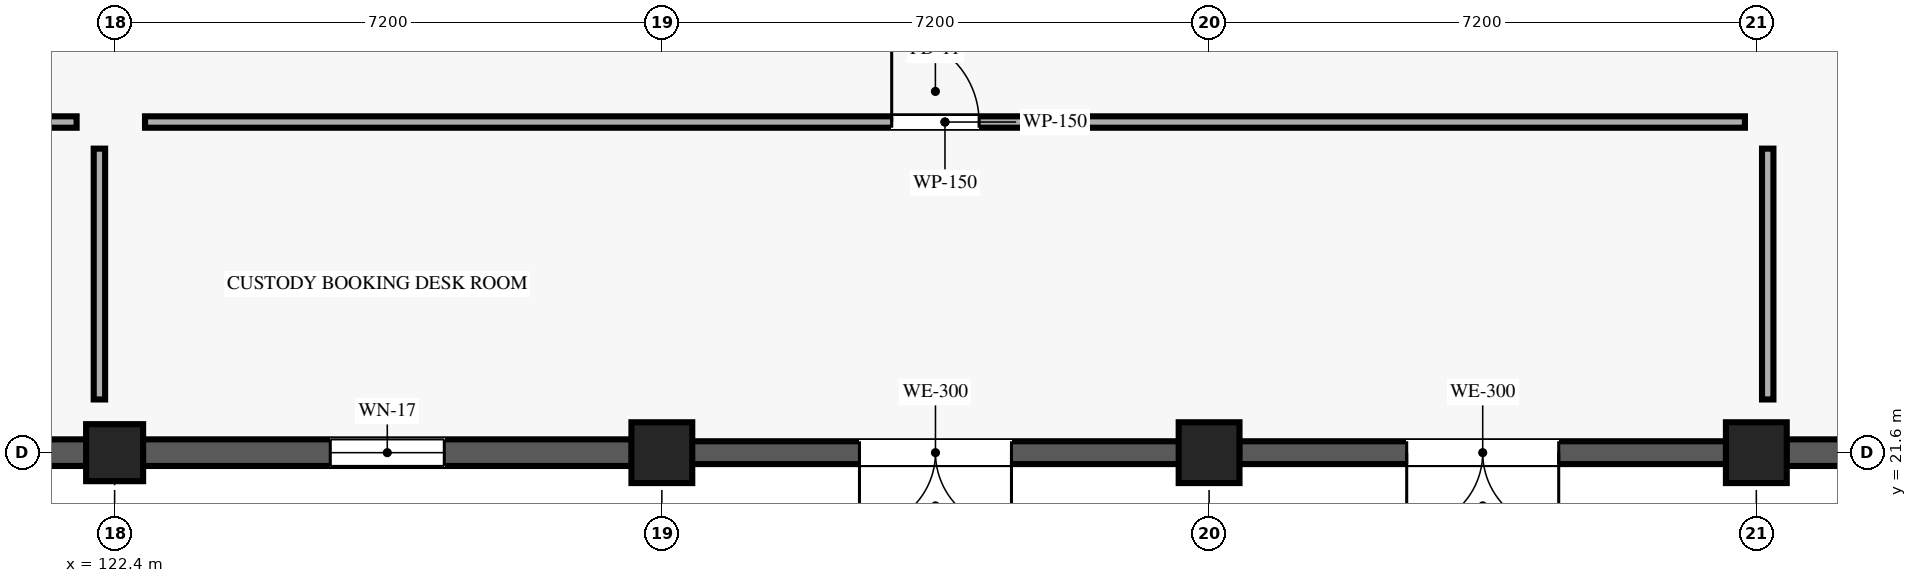
"""IFC4 building model, lengths in metres.
Left out: names, types, materials, properties, quantities, classifications, styles, units other than length and angle.
Written with IfcOpenShell. Run it as: python <this file> out.ifc"""

import sys

from ifc_helpers import new_model, si_unit, direction, frame, frame_2d, origin, origin_2d, place, context, subcontext, project, spatial, rectangle, extrude, element, fill, save


model = new_model("IFC4")
c1 = context("Model", 3, precision=1e-05, world=origin(), true_north=direction((0.0, 1.0)))
c2 = subcontext(c1, "Body", "Model", "MODEL_VIEW")
j1 = project(units=[si_unit("LENGTHUNIT", "METRE"), si_unit("PLANEANGLEUNIT", "RADIAN")], contexts=[c1])
p1 = place(None, origin())
s1 = spatial("IfcSite", under=j1, at=p1, CompositionType="ELEMENT")
p2 = place(p1, origin())
s2 = spatial("IfcBuilding", under=s1, at=p2, CompositionType="ELEMENT")
p3 = place(p2, origin())
s3 = spatial("IfcBuildingStorey", under=s2, at=p3, CompositionType="ELEMENT", Elevation=0.0)
p4 = place(p3, frame((122.4, 21.6, 0.0), z_axis=(0.0, 0.0, 1.0), x_axis=(1.0, 0.0, 0.0)))
e1 = element("IfcColumn", 1, at=p4, inside=s3, PredefinedType="COLUMN", context=c2, shape_type="SweptSolid", body=[
    extrude(rectangle(XDim=0.75, YDim=0.75, at=origin_2d()), origin(), (0.0, 0.0, 1.0), 5.4),
])
for number, where, z_axis, x_axis in (
    (2, (129.6, 21.6, 0.0), (0.0, 0.0, 1.0), (1.0, 0.0, 0.0)),
    (3, (136.8, 21.6, 0.0), (0.0, 0.0, 1.0), (1.0, 0.0, 0.0)),
    (4, (144.0, 21.6, 0.0), (0.0, 0.0, 1.0), (1.0, 0.0, 0.0)),
):
    element("IfcColumn", number, at=place(p3, frame(where, z_axis=z_axis, x_axis=x_axis)), inside=s3, PredefinedType="COLUMN", context=c2, shape_type="SweptSolid", body=[
        extrude(rectangle(XDim=0.8, YDim=0.8, at=origin_2d()), origin(), (0.0, 0.0, 1.0), 5.4),
    ])
p5 = place(p3, frame((115.57, 21.6, 0.0), z_axis=(0.0, 0.0, 1.0), x_axis=(1.0, 0.0, 0.0)))
e5 = element("IfcWall", 5, at=p5, inside=s3, PredefinedType="SOLIDWALL", context=c2, shape_type="SweptSolid", body=[
    extrude(rectangle(XDim=6.46, YDim=0.35, at=frame_2d((3.23, 0.0))), origin(), (0.0, 0.0, 1.0), 5.16),
])
p6 = place(p5, frame((2.33, 0.0, 1.85)))
e6 = element("IfcOpeningElement", 6, at=p6, cuts=e5, PredefinedType="OPENING", context=c2, shape_type="SweptSolid", body=[
    extrude(rectangle(XDim=1.8, YDim=0.75, at=frame_2d((0.9, 0.375))), frame((0.0, 0.185, 0.0), z_axis=(0.0, -1.0, 0.0), x_axis=(1.0, 0.0, 0.0)), (0.0, 0.0, 1.0), 0.37),
])
p7 = place(p3, frame((122.77, 21.6, 0.0), z_axis=(0.0, 0.0, 1.0), x_axis=(1.0, 0.0, 0.0)))
e7 = element("IfcWall", 7, at=p7, inside=s3, PredefinedType="SOLIDWALL", context=c2, shape_type="SweptSolid", body=[
    extrude(rectangle(XDim=6.435, YDim=0.35, at=frame_2d((3.218, 0.0))), origin(), (0.0, 0.0, 1.0), 5.16),
])
p8 = place(p7, frame((2.468, 0.0, 1.85)))
e8 = element("IfcOpeningElement", 8, at=p8, cuts=e7, PredefinedType="OPENING", context=c2, shape_type="SweptSolid", body=[
    extrude(rectangle(XDim=1.5, YDim=0.7, at=frame_2d((0.75, 0.35))), frame((0.0, 0.185, 0.0), z_axis=(0.0, -1.0, 0.0), x_axis=(1.0, 0.0, 0.0)), (0.0, 0.0, 1.0), 0.37),
])
p9 = place(p3, frame((136.405, 21.6, 0.0), z_axis=(0.0, 0.0, 1.0), x_axis=(-1.0, 0.0, 0.0)))
e9 = element("IfcWall", 9, at=p9, inside=s3, PredefinedType="SOLIDWALL", context=c2, shape_type="SweptSolid", body=[
    extrude(rectangle(XDim=6.41, YDim=0.3, at=frame_2d((3.205, 0.0))), origin(), (0.0, 0.0, 1.0), 5.16),
])
p10 = place(p9, frame((2.205, 0.0, 0.0)))
e10 = element("IfcOpeningElement", 10, at=p10, cuts=e9, PredefinedType="OPENING", context=c2, shape_type="SweptSolid", body=[
    extrude(rectangle(XDim=2.0, YDim=2.3, at=frame_2d((1.0, 1.15))), frame((0.0, 0.16, 0.0), z_axis=(0.0, -1.0, 0.0), x_axis=(1.0, 0.0, 0.0)), (0.0, 0.0, 1.0), 0.32),
])
p11 = place(p3, frame((143.605, 21.6, 0.0), z_axis=(0.0, 0.0, 1.0), x_axis=(-1.0, 0.0, 0.0)))
e11 = element("IfcWall", 11, at=p11, inside=s3, PredefinedType="SOLIDWALL", context=c2, shape_type="SweptSolid", body=[
    extrude(rectangle(XDim=6.41, YDim=0.3, at=frame_2d((3.205, 0.0))), origin(), (0.0, 0.0, 1.0), 5.16),
])
p12 = place(p11, frame((2.205, 0.0, 0.0)))
e12 = element("IfcOpeningElement", 12, at=p12, cuts=e11, PredefinedType="OPENING", context=c2, shape_type="SweptSolid", body=[
    extrude(rectangle(XDim=2.0, YDim=2.3, at=frame_2d((1.0, 1.15))), frame((0.0, 0.16, 0.0), z_axis=(0.0, -1.0, 0.0), x_axis=(1.0, 0.0, 0.0)), (0.0, 0.0, 1.0), 0.32),
])
p13 = place(p3, frame((144.395, 21.6, 0.0), z_axis=(0.0, 0.0, 1.0), x_axis=(1.0, 0.0, 0.0)))
e13 = element("IfcWall", 13, at=p13, inside=s3, PredefinedType="SOLIDWALL", context=c2, shape_type="SweptSolid", body=[
    extrude(rectangle(XDim=6.41, YDim=0.35, at=frame_2d((3.205, 0.0))), origin(), (0.0, 0.0, 1.0), 5.16),
])
p14 = place(p13, frame((2.305, 0.0, 1.85)))
e14 = element("IfcOpeningElement", 14, at=p14, cuts=e13, PredefinedType="OPENING", context=c2, shape_type="SweptSolid", body=[
    extrude(rectangle(XDim=1.8, YDim=0.75, at=frame_2d((0.9, 0.375))), frame((0.0, 0.185, 0.0), z_axis=(0.0, -1.0, 0.0), x_axis=(1.0, 0.0, 0.0)), (0.0, 0.0, 1.0), 0.37),
])
p15 = place(p3, frame((122.2, 22.3, 0.0), z_axis=(0.0, 0.0, 1.0), x_axis=(0.0, 1.0, 0.0)))
e15 = element("IfcWall", 15, at=p15, inside=s3, PredefinedType="PARTITIONING", context=c2, shape_type="SweptSolid", body=[
    extrude(rectangle(XDim=3.3, YDim=0.15, at=frame_2d((1.65, 0.0))), origin(), (0.0, 0.0, 1.0), 4.5),
])
p16 = place(p3, frame((108.65, 25.95, 0.0), z_axis=(0.0, 0.0, 1.0), x_axis=(1.0, 0.0, 0.0)))
e16 = element("IfcWall", 16, at=p16, inside=s3, PredefinedType="PARTITIONING", context=c2, shape_type="SweptSolid", body=[
    extrude(rectangle(XDim=13.25, YDim=0.15, at=frame_2d((6.625, 0.0))), origin(), (0.0, 0.0, 1.0), 5.16),
])
p17 = place(p16, frame((9.58, 0.0, 0.0)))
e17 = element("IfcOpeningElement", 17, at=p17, cuts=e16, PredefinedType="OPENING", context=c2, shape_type="SweptSolid", body=[
    extrude(rectangle(XDim=1.15, YDim=2.15, at=frame_2d((0.575, 1.075))), frame((0.0, 0.085, 0.0), z_axis=(0.0, -1.0, 0.0), x_axis=(1.0, 0.0, 0.0)), (0.0, 0.0, 1.0), 0.17),
])
p18 = place(p3, frame((144.15, 22.3, 0.0), z_axis=(0.0, 0.0, 1.0), x_axis=(0.0, 1.0, 0.0)))
e18 = element("IfcWall", 18, at=p18, inside=s3, PredefinedType="PARTITIONING", context=c2, shape_type="SweptSolid", body=[
    extrude(rectangle(XDim=3.3, YDim=0.15, at=frame_2d((1.65, 0.0))), origin(), (0.0, 0.0, 1.0), 4.5),
])
p19 = place(p3, frame((122.8, 25.95, 0.0), z_axis=(0.0, 0.0, 1.0), x_axis=(1.0, 0.0, 0.0)))
e19 = element("IfcWall", 19, at=p19, inside=s3, PredefinedType="PARTITIONING", context=c2, shape_type="SweptSolid", body=[
    extrude(rectangle(XDim=21.05, YDim=0.15, at=frame_2d((10.525, 0.0))), origin(), (0.0, 0.0, 1.0), 5.16),
])
p20 = place(p19, frame((9.824, 0.0, 0.0)))
e20 = element("IfcOpeningElement", 20, at=p20, cuts=e19, PredefinedType="OPENING", context=c2, shape_type="SweptSolid", body=[
    extrude(rectangle(XDim=1.15, YDim=2.15, at=frame_2d((0.575, 1.075))), frame((0.0, 0.085, 0.0), z_axis=(0.0, -1.0, 0.0), x_axis=(1.0, 0.0, 0.0)), (0.0, 0.0, 1.0), 0.17),
])
p21 = place(p8, origin())
e21 = element("IfcWindow", 21, at=p21, inside=s3, PartitioningType="SINGLE_PANEL", PredefinedType="WINDOW", context=c2, shape_type="SweptSolid", body=[
    extrude(rectangle(XDim=1.5, YDim=0.7, at=frame_2d((0.75, 0.35))), frame((0.0, 0.03, 0.0), z_axis=(0.0, -1.0, 0.0), x_axis=(1.0, 0.0, 0.0)), (0.0, 0.0, 1.0), 0.06),
])
fill(e8, e21)
p22 = place(p10, origin())
e22 = element("IfcDoor", 22, at=p22, inside=s3, OperationType="DOUBLE_DOOR_SINGLE_SWING", PredefinedType="DOOR", context=c2, shape_type="SweptSolid", body=[
    extrude(rectangle(XDim=2.0, YDim=2.3, at=frame_2d((1.0, 1.15))), frame((0.0, 0.025, 0.0), z_axis=(0.0, -1.0, 0.0), x_axis=(1.0, 0.0, 0.0)), (0.0, 0.0, 1.0), 0.05),
])
fill(e10, e22)
p23 = place(p12, origin())
e23 = element("IfcDoor", 23, at=p23, inside=s3, OperationType="DOUBLE_DOOR_SINGLE_SWING", PredefinedType="DOOR", context=c2, shape_type="SweptSolid", body=[
    extrude(rectangle(XDim=2.0, YDim=2.3, at=frame_2d((1.0, 1.15))), frame((0.0, 0.025, 0.0), z_axis=(0.0, -1.0, 0.0), x_axis=(1.0, 0.0, 0.0)), (0.0, 0.0, 1.0), 0.05),
])
fill(e12, e23)
p24 = place(p20, origin())
e24 = element("IfcDoor", 24, at=p24, inside=s3, OperationType="SINGLE_SWING_LEFT", PredefinedType="DOOR", context=c2, shape_type="SweptSolid", body=[
    extrude(rectangle(XDim=1.15, YDim=2.15, at=frame_2d((0.575, 1.075))), frame((0.0, 0.025, 0.0), z_axis=(0.0, -1.0, 0.0), x_axis=(1.0, 0.0, 0.0)), (0.0, 0.0, 1.0), 0.05),
])
fill(e20, e24)
save(model, sys.argv[1])
